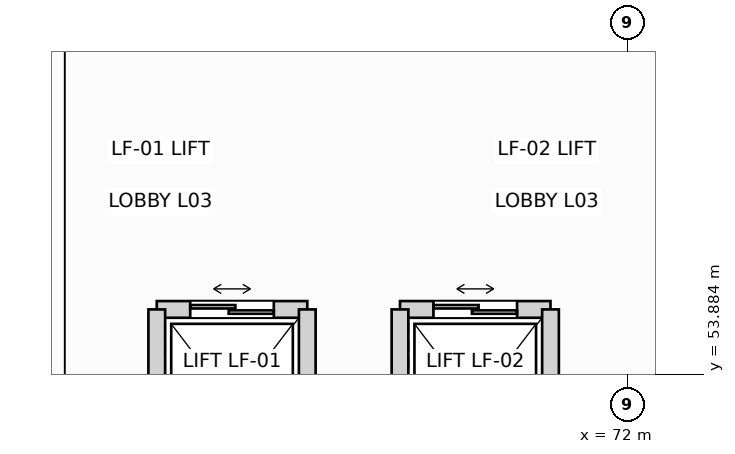
"""IFC4 building model, lengths in metres.
Left out: names, types, materials, properties, quantities, classifications, styles, units other than length and angle.
Written with IfcOpenShell. Run it as: python <this file> out.ifc"""

import sys

from ifc_helpers import new_model, si_unit, direction, frame, frame_2d, origin, place, context, subcontext, project, spatial, rectangle, extrude, element, fill, save


model = new_model("IFC4")
c1 = context("Model", 3, precision=1e-05, world=origin(), true_north=direction((0.0, 1.0)))
c2 = subcontext(c1, "Body", "Model", "MODEL_VIEW")
j1 = project(units=[si_unit("LENGTHUNIT", "METRE"), si_unit("PLANEANGLEUNIT", "RADIAN")], contexts=[c1])
p1 = place(None, origin())
s1 = spatial("IfcSite", under=j1, at=p1, CompositionType="ELEMENT")
p2 = place(p1, origin())
s2 = spatial("IfcBuilding", under=s1, at=p2, CompositionType="ELEMENT")
p3 = place(p2, frame((0.0, 0.0, 16.8)))
s3 = spatial("IfcBuildingStorey", under=s2, at=p3, CompositionType="ELEMENT", Elevation=16.8)
p4 = place(p3, frame((65.81, 54.74, 0.0), z_axis=(0.0, 0.0, 1.0), x_axis=(1.0, 0.0, 0.0)))
e1 = element("IfcWall", 1, at=p4, inside=s3, PredefinedType="PARTITIONING", context=c2, shape_type="SweptSolid", body=[
    extrude(rectangle(XDim=1.98, YDim=0.22, at=frame_2d((0.99, 0.0))), origin(), (0.0, 0.0, 1.0), 4.485),
])
p5 = place(p4, frame((0.44, 0.0, 0.0)))
e2 = element("IfcOpeningElement", 2, at=p5, cuts=e1, PredefinedType="OPENING", context=c2, shape_type="SweptSolid", body=[
    extrude(rectangle(XDim=1.1, YDim=2.18, at=frame_2d((0.55, 1.09))), frame((0.0, 0.12, 0.0), z_axis=(0.0, -1.0, 0.0), x_axis=(1.0, 0.0, 0.0)), (0.0, 0.0, 1.0), 0.24),
])
for number, where, z_axis, x_axis in (
    (3, (65.81, 52.26, 0.0), (0.0, 0.0, 1.0), (0.0, 1.0, 0.0)),
    (4, (67.79, 52.26, 0.0), (0.0, 0.0, 1.0), (0.0, 1.0, 0.0)),
):
    element("IfcWall", number, at=place(p3, frame(where, z_axis=z_axis, x_axis=x_axis)), inside=s3, PredefinedType="PARTITIONING", context=c2, shape_type="SweptSolid", body=[
        extrude(rectangle(XDim=2.48, YDim=0.22, at=frame_2d((1.24, 0.0))), origin(), (0.0, 0.0, 1.0), 4.485),
    ])
p6 = place(p3, frame((69.01, 54.74, 0.0), z_axis=(0.0, 0.0, 1.0), x_axis=(1.0, 0.0, 0.0)))
e5 = element("IfcWall", 5, at=p6, inside=s3, PredefinedType="PARTITIONING", context=c2, shape_type="SweptSolid", body=[
    extrude(rectangle(XDim=1.98, YDim=0.22, at=frame_2d((0.99, 0.0))), origin(), (0.0, 0.0, 1.0), 4.485),
])
p7 = place(p6, frame((0.44, 0.0, 0.0)))
e6 = element("IfcOpeningElement", 6, at=p7, cuts=e5, PredefinedType="OPENING", context=c2, shape_type="SweptSolid", body=[
    extrude(rectangle(XDim=1.1, YDim=2.18, at=frame_2d((0.55, 1.09))), frame((0.0, 0.12, 0.0), z_axis=(0.0, -1.0, 0.0), x_axis=(1.0, 0.0, 0.0)), (0.0, 0.0, 1.0), 0.24),
])
for number, where, z_axis, x_axis in (
    (7, (69.01, 52.26, 0.0), (0.0, 0.0, 1.0), (0.0, 1.0, 0.0)),
    (8, (70.99, 52.26, 0.0), (0.0, 0.0, 1.0), (0.0, 1.0, 0.0)),
):
    element("IfcWall", number, at=place(p3, frame(where, z_axis=z_axis, x_axis=x_axis)), inside=s3, PredefinedType="PARTITIONING", context=c2, shape_type="SweptSolid", body=[
        extrude(rectangle(XDim=2.48, YDim=0.22, at=frame_2d((1.24, 0.0))), origin(), (0.0, 0.0, 1.0), 4.485),
    ])
p8 = place(p5, origin())
e9 = element("IfcDoor", 9, at=p8, inside=s3, OperationType="DOUBLE_DOOR_SLIDING", PredefinedType="DOOR", context=c2, shape_type="SweptSolid", body=[
    extrude(rectangle(XDim=1.1, YDim=2.18, at=frame_2d((0.55, 1.09))), frame((0.0, 0.025, 0.0), z_axis=(0.0, -1.0, 0.0), x_axis=(1.0, 0.0, 0.0)), (0.0, 0.0, 1.0), 0.05),
])
fill(e2, e9)
p9 = place(p7, origin())
e10 = element("IfcDoor", 10, at=p9, inside=s3, OperationType="DOUBLE_DOOR_SLIDING", PredefinedType="DOOR", context=c2, shape_type="SweptSolid", body=[
    extrude(rectangle(XDim=1.1, YDim=2.18, at=frame_2d((0.55, 1.09))), frame((0.0, 0.025, 0.0), z_axis=(0.0, -1.0, 0.0), x_axis=(1.0, 0.0, 0.0)), (0.0, 0.0, 1.0), 0.05),
])
fill(e6, e10)
save(model, sys.argv[1])
